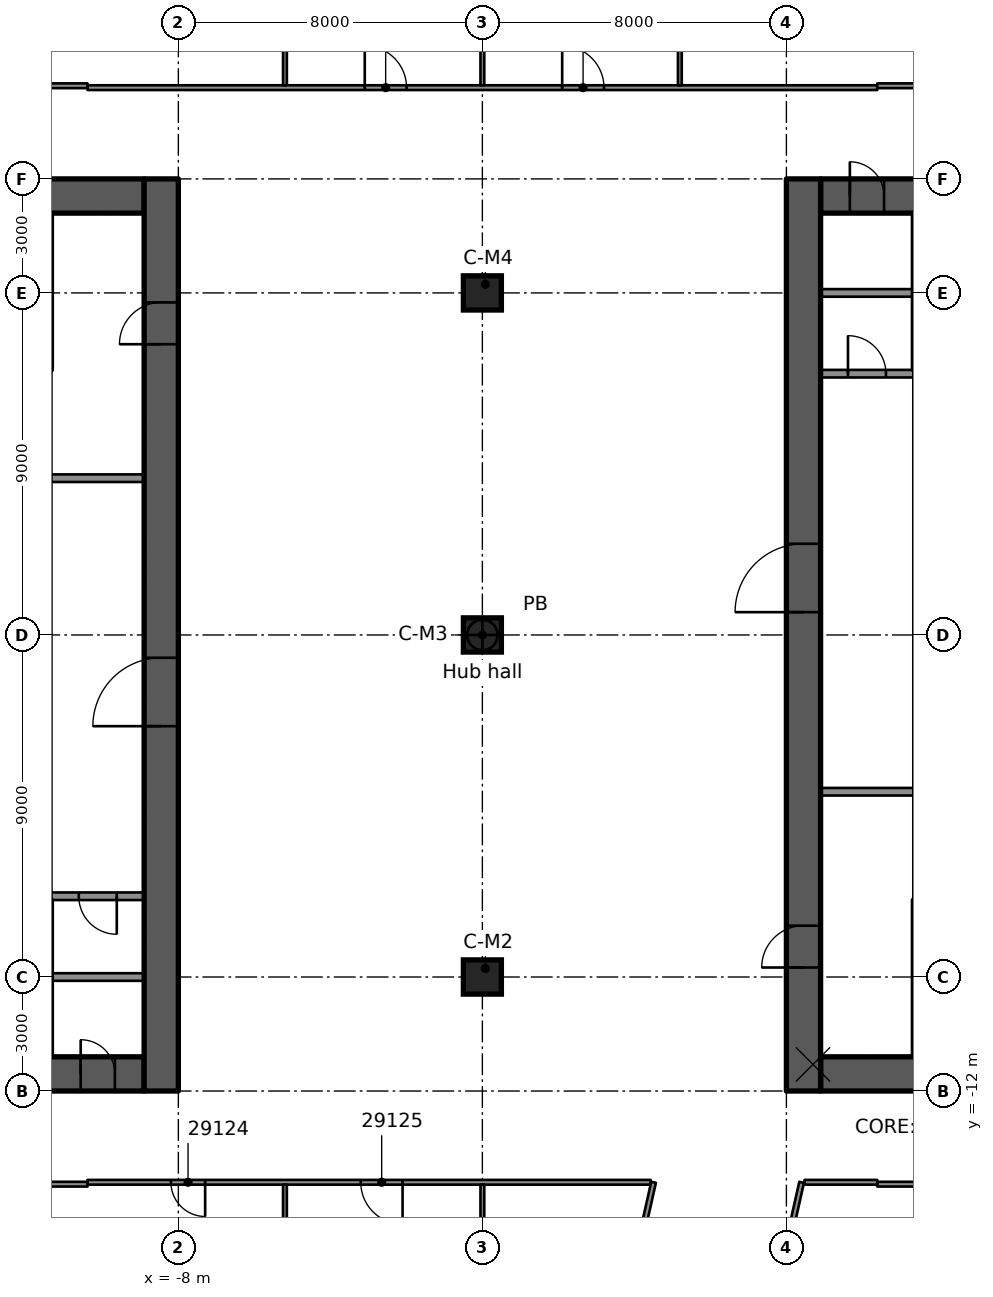
"""IFC4 building model, lengths in metres.
Left out: names, types, materials, properties, quantities, classifications, styles, units other than length and angle.
Written with IfcOpenShell. Run it as: python <this file> out.ifc"""

import sys

from ifc_helpers import new_model, si_unit, direction, frame, frame_2d, origin, origin_2d, place, context, subcontext, project, spatial, rectangle, extrude, element, fill, save


model = new_model("IFC4")
c1 = context("Model", 3, precision=1e-05, world=origin(), true_north=direction((0.0, 1.0)))
c2 = subcontext(c1, "Body", "Model", "MODEL_VIEW")
j1 = project(units=[si_unit("LENGTHUNIT", "METRE"), si_unit("PLANEANGLEUNIT", "RADIAN")], contexts=[c1])
p1 = place(None, origin())
s1 = spatial("IfcSite", under=j1, at=p1, CompositionType="ELEMENT")
p2 = place(p1, origin())
s2 = spatial("IfcBuilding", under=s1, at=p2, CompositionType="ELEMENT")
p3 = place(p2, frame((0.0, 0.0, 149.1)))
s3 = spatial("IfcBuildingStorey", under=s2, at=p3, CompositionType="ELEMENT", Elevation=149.1)
p4 = place(p3, frame((-18.1, 11.55, 0.0), z_axis=(0.0, 0.0, 1.0), x_axis=(1.0, 0.0, 0.0)))
e1 = element("IfcWall", 1, at=p4, inside=s3, PredefinedType="SHEAR", context=c2, shape_type="SweptSolid", body=[
    extrude(rectangle(XDim=9.2, YDim=0.9, at=frame_2d((4.6, 0.0))), origin(), (0.0, 0.0, 1.0), 3.5),
])
p5 = place(p4, frame((5.1, 0.0, 0.0)))
e2 = element("IfcOpeningElement", 2, at=p5, cuts=e1, PredefinedType="OPENING", context=c2, shape_type="SweptSolid", body=[
    extrude(rectangle(XDim=1.1, YDim=2.1, at=frame_2d((0.55, 1.05))), frame((0.0, 0.46, 0.0), z_axis=(0.0, -1.0, 0.0), x_axis=(1.0, 0.0, 0.0)), (0.0, 0.0, 1.0), 0.92),
])
p6 = place(p3, frame((-18.1, -11.55, 0.0), z_axis=(0.0, 0.0, 1.0), x_axis=(1.0, 0.0, 0.0)))
e3 = element("IfcWall", 3, at=p6, inside=s3, PredefinedType="SHEAR", context=c2, shape_type="SweptSolid", body=[
    extrude(rectangle(XDim=9.2, YDim=0.9, at=frame_2d((4.6, 0.0))), origin(), (0.0, 0.0, 1.0), 3.5),
])
p7 = place(p6, frame((5.1, 0.0, 0.0)))
e4 = element("IfcOpeningElement", 4, at=p7, cuts=e3, PredefinedType="OPENING", context=c2, shape_type="SweptSolid", body=[
    extrude(rectangle(XDim=1.1, YDim=2.1, at=frame_2d((0.55, 1.05))), frame((0.0, 0.46, 0.0), z_axis=(0.0, -1.0, 0.0), x_axis=(1.0, 0.0, 0.0)), (0.0, 0.0, 1.0), 0.92),
])
p8 = place(p6, frame((7.53, 0.0, 0.0)))
e5 = element("IfcOpeningElement", 5, at=p8, cuts=e3, PredefinedType="OPENING", context=c2, shape_type="SweptSolid", body=[
    extrude(rectangle(XDim=0.9, YDim=2.1, at=frame_2d((0.45, 1.05))), frame((0.0, 0.46, 0.0), z_axis=(0.0, -1.0, 0.0), x_axis=(1.0, 0.0, 0.0)), (0.0, 0.0, 1.0), 0.92),
])
p9 = place(p3, frame((-8.45, -12.0, 0.0), z_axis=(0.0, 0.0, 1.0), x_axis=(0.0, 1.0, 0.0)))
e6 = element("IfcWall", 6, at=p9, inside=s3, PredefinedType="SHEAR", context=c2, shape_type="SweptSolid", body=[
    extrude(rectangle(XDim=24.0, YDim=0.9, at=frame_2d((12.0, 0.0))), origin(), (0.0, 0.0, 1.0), 3.5),
])
p10 = place(p9, frame((9.6, 0.0, 0.0)))
e7 = element("IfcOpeningElement", 7, at=p10, cuts=e6, PredefinedType="OPENING", context=c2, shape_type="SweptSolid", body=[
    extrude(rectangle(XDim=1.8, YDim=2.1, at=frame_2d((0.9, 1.05))), frame((0.0, 0.46, 0.0), z_axis=(0.0, -1.0, 0.0), x_axis=(1.0, 0.0, 0.0)), (0.0, 0.0, 1.0), 0.92),
])
p11 = place(p9, frame((19.65, 0.0, 0.0)))
e8 = element("IfcOpeningElement", 8, at=p11, cuts=e6, PredefinedType="OPENING", context=c2, shape_type="SweptSolid", body=[
    extrude(rectangle(XDim=1.1, YDim=2.1, at=frame_2d((0.55, 1.05))), frame((0.0, 0.46, 0.0), z_axis=(0.0, -1.0, 0.0), x_axis=(1.0, 0.0, 0.0)), (0.0, 0.0, 1.0), 0.92),
])
p12 = place(p3, frame((8.9, 11.55, 0.0), z_axis=(0.0, 0.0, 1.0), x_axis=(1.0, 0.0, 0.0)))
e9 = element("IfcWall", 9, at=p12, inside=s3, PredefinedType="SHEAR", context=c2, shape_type="SweptSolid", body=[
    extrude(rectangle(XDim=9.2, YDim=0.9, at=frame_2d((4.6, 0.0))), origin(), (0.0, 0.0, 1.0), 3.5),
])
p13 = place(p12, frame((3.0, 0.0, 0.0)))
e10 = element("IfcOpeningElement", 10, at=p13, cuts=e9, PredefinedType="OPENING", context=c2, shape_type="SweptSolid", body=[
    extrude(rectangle(XDim=1.1, YDim=2.1, at=frame_2d((0.55, 1.05))), frame((0.0, 0.46, 0.0), z_axis=(0.0, -1.0, 0.0), x_axis=(1.0, 0.0, 0.0)), (0.0, 0.0, 1.0), 0.92),
])
p14 = place(p12, frame((0.77, 0.0, 0.0)))
e11 = element("IfcOpeningElement", 11, at=p14, cuts=e9, PredefinedType="OPENING", context=c2, shape_type="SweptSolid", body=[
    extrude(rectangle(XDim=0.9, YDim=2.1, at=frame_2d((0.45, 1.05))), frame((0.0, 0.46, 0.0), z_axis=(0.0, -1.0, 0.0), x_axis=(1.0, 0.0, 0.0)), (0.0, 0.0, 1.0), 0.92),
])
p15 = place(p3, frame((8.9, -11.55, 0.0), z_axis=(0.0, 0.0, 1.0), x_axis=(1.0, 0.0, 0.0)))
e12 = element("IfcWall", 12, at=p15, inside=s3, PredefinedType="SHEAR", context=c2, shape_type="SweptSolid", body=[
    extrude(rectangle(XDim=9.2, YDim=0.9, at=frame_2d((4.6, 0.0))), origin(), (0.0, 0.0, 1.0), 3.5),
])
p16 = place(p15, frame((3.0, 0.0, 0.0)))
e13 = element("IfcOpeningElement", 13, at=p16, cuts=e12, PredefinedType="OPENING", context=c2, shape_type="SweptSolid", body=[
    extrude(rectangle(XDim=1.1, YDim=2.1, at=frame_2d((0.55, 1.05))), frame((0.0, 0.46, 0.0), z_axis=(0.0, -1.0, 0.0), x_axis=(1.0, 0.0, 0.0)), (0.0, 0.0, 1.0), 0.92),
])
p17 = place(p3, frame((8.45, -12.0, 0.0), z_axis=(0.0, 0.0, 1.0), x_axis=(0.0, 1.0, 0.0)))
e14 = element("IfcWall", 14, at=p17, inside=s3, PredefinedType="SHEAR", context=c2, shape_type="SweptSolid", body=[
    extrude(rectangle(XDim=24.0, YDim=0.9, at=frame_2d((12.0, 0.0))), origin(), (0.0, 0.0, 1.0), 3.5),
])
p18 = place(p17, frame((12.6, 0.0, 0.0)))
e15 = element("IfcOpeningElement", 15, at=p18, cuts=e14, PredefinedType="OPENING", context=c2, shape_type="SweptSolid", body=[
    extrude(rectangle(XDim=1.8, YDim=2.1, at=frame_2d((0.9, 1.05))), frame((0.0, 0.46, 0.0), z_axis=(0.0, -1.0, 0.0), x_axis=(1.0, 0.0, 0.0)), (0.0, 0.0, 1.0), 0.92),
])
p19 = place(p17, frame((3.25, 0.0, 0.0)))
e16 = element("IfcOpeningElement", 16, at=p19, cuts=e14, PredefinedType="OPENING", context=c2, shape_type="SweptSolid", body=[
    extrude(rectangle(XDim=1.1, YDim=2.1, at=frame_2d((0.55, 1.05))), frame((0.0, 0.46, 0.0), z_axis=(0.0, -1.0, 0.0), x_axis=(1.0, 0.0, 0.0)), (0.0, 0.0, 1.0), 0.92),
])
for number, where, z_axis, x_axis in (
    (17, (0.0, -9.0, 0.0), (0.0, 0.0, 1.0), (1.0, 0.0, 0.0)),
    (18, (0.0, 0.0, 0.0), (0.0, 0.0, 1.0), (1.0, 0.0, 0.0)),
    (19, (0.0, 9.0, 0.0), (0.0, 0.0, 1.0), (1.0, 0.0, 0.0)),
):
    element("IfcColumn", number, at=place(p3, frame(where, z_axis=z_axis, x_axis=x_axis)), inside=s3, PredefinedType="COLUMN", context=c2, shape_type="SweptSolid", body=[
        extrude(rectangle(XDim=1.0, YDim=0.9, at=origin_2d()), origin(), (0.0, 0.0, 1.0), 3.5),
    ])
p20 = place(p3, frame((-8.9, 4.125, 0.0), z_axis=(0.0, 0.0, 1.0), x_axis=(-1.0, 0.0, 0.0)))
e20 = element("IfcWall", 20, at=p20, inside=s3, PredefinedType="PARTITIONING", context=c2, shape_type="SweptSolid", body=[
    extrude(rectangle(XDim=2.44, YDim=0.2, at=frame_2d((1.22, 0.0))), origin(), (0.0, 0.0, 1.0), 3.09),
])
p21 = place(p3, frame((-8.9, -6.875, 0.0), z_axis=(0.0, 0.0, 1.0), x_axis=(-1.0, 0.0, 0.0)))
e21 = element("IfcWall", 21, at=p21, inside=s3, PredefinedType="PARTITIONING", context=c2, shape_type="SweptSolid", body=[
    extrude(rectangle(XDim=2.44, YDim=0.2, at=frame_2d((1.22, 0.0))), origin(), (0.0, 0.0, 1.0), 3.09),
])
p22 = place(p21, frame((0.72, 0.0, 0.0)))
e22 = element("IfcOpeningElement", 22, at=p22, cuts=e21, PredefinedType="OPENING", context=c2, shape_type="SweptSolid", body=[
    extrude(rectangle(XDim=1.0, YDim=2.1, at=frame_2d((0.5, 1.05))), frame((0.0, 0.11, 0.0), z_axis=(0.0, -1.0, 0.0), x_axis=(1.0, 0.0, 0.0)), (0.0, 0.0, 1.0), 0.22),
])
for number, where, z_axis, x_axis in (
    (23, (-8.9, -9.0, 0.0), (0.0, 0.0, 1.0), (-1.0, 0.0, 0.0)),
    (24, (8.9, -4.125, 0.0), (0.0, 0.0, 1.0), (1.0, 0.0, 0.0)),
):
    element("IfcWall", number, at=place(p3, frame(where, z_axis=z_axis, x_axis=x_axis)), inside=s3, PredefinedType="PARTITIONING", context=c2, shape_type="SweptSolid", body=[
        extrude(rectangle(XDim=2.44, YDim=0.2, at=frame_2d((1.22, 0.0))), origin(), (0.0, 0.0, 1.0), 3.09),
    ])
p23 = place(p3, frame((8.9, 6.875, 0.0), z_axis=(0.0, 0.0, 1.0), x_axis=(1.0, 0.0, 0.0)))
e25 = element("IfcWall", 25, at=p23, inside=s3, PredefinedType="PARTITIONING", context=c2, shape_type="SweptSolid", body=[
    extrude(rectangle(XDim=2.44, YDim=0.2, at=frame_2d((1.22, 0.0))), origin(), (0.0, 0.0, 1.0), 3.09),
])
p24 = place(p23, frame((0.72, 0.0, 0.0)))
e26 = element("IfcOpeningElement", 26, at=p24, cuts=e25, PredefinedType="OPENING", context=c2, shape_type="SweptSolid", body=[
    extrude(rectangle(XDim=1.0, YDim=2.1, at=frame_2d((0.5, 1.05))), frame((0.0, 0.11, 0.0), z_axis=(0.0, -1.0, 0.0), x_axis=(1.0, 0.0, 0.0)), (0.0, 0.0, 1.0), 0.22),
])
p25 = place(p3, frame((8.9, 9.0, 0.0), z_axis=(0.0, 0.0, 1.0), x_axis=(1.0, 0.0, 0.0)))
e27 = element("IfcWall", 27, at=p25, inside=s3, PredefinedType="PARTITIONING", context=c2, shape_type="SweptSolid", body=[
    extrude(rectangle(XDim=2.44, YDim=0.2, at=frame_2d((1.22, 0.0))), origin(), (0.0, 0.0, 1.0), 3.09),
])
p26 = place(p3, frame((-10.391, -14.451, 0.0), z_axis=(0.0, 0.0, 1.0), x_axis=(-1.0, 0.0, 0.0)))
e28 = element("IfcWall", 28, at=p26, inside=s3, PredefinedType="PARTITIONING", context=c2, shape_type="SweptSolid", body=[
    extrude(rectangle(XDim=5.043, YDim=0.125, at=frame_2d((2.521, 0.0))), origin(), (0.0, 0.0, 1.0), 3.08),
])
p27 = place(p26, frame((2.1, 0.0, 0.0)))
e29 = element("IfcOpeningElement", 29, at=p27, cuts=e28, PredefinedType="OPENING", context=c2, shape_type="SweptSolid", body=[
    extrude(rectangle(XDim=0.9, YDim=2.1, at=frame_2d((0.45, 1.05))), frame((0.0, 0.073, 0.0), z_axis=(0.0, -1.0, 0.0), x_axis=(1.0, 0.0, 0.0)), (0.0, 0.0, 1.0), 0.145),
])
p28 = place(p3, frame((21.387, -14.451, 0.0), z_axis=(0.0, 0.0, 1.0), x_axis=(-1.0, 0.0, 0.0)))
e30 = element("IfcWall", 30, at=p28, inside=s3, PredefinedType="PARTITIONING", context=c2, shape_type="SweptSolid", body=[
    extrude(rectangle(XDim=10.996, YDim=0.125, at=frame_2d((5.498, 0.0))), origin(), (0.0, 0.0, 1.0), 3.08),
])
p29 = place(p28, frame((5.038, 0.0, 0.0)))
e31 = element("IfcOpeningElement", 31, at=p29, cuts=e30, PredefinedType="OPENING", context=c2, shape_type="SweptSolid", body=[
    extrude(rectangle(XDim=0.9, YDim=2.1, at=frame_2d((0.45, 1.05))), frame((0.0, 0.073, 0.0), z_axis=(0.0, -1.0, 0.0), x_axis=(1.0, 0.0, 0.0)), (0.0, 0.0, 1.0), 0.145),
])
p30 = place(p3, frame((4.427, -14.401, 0.0), z_axis=(0.0, 0.0, 1.0), x_axis=(-1.0, 0.0, 0.0)))
e32 = element("IfcWall", 32, at=p30, inside=s3, PredefinedType="PARTITIONING", context=c2, shape_type="SweptSolid", body=[
    extrude(rectangle(XDim=14.817, YDim=0.125, at=frame_2d((7.408, 0.0))), origin(), (0.0, 0.0, 1.0), 3.08),
])
p31 = place(p30, frame((11.722, 0.0, 0.0)))
e33 = element("IfcOpeningElement", 33, at=p31, cuts=e32, PredefinedType="OPENING", context=c2, shape_type="SweptSolid", body=[
    extrude(rectangle(XDim=0.9, YDim=2.1, at=frame_2d((0.45, 1.05))), frame((0.0, 0.073, 0.0), z_axis=(0.0, -1.0, 0.0), x_axis=(1.0, 0.0, 0.0)), (0.0, 0.0, 1.0), 0.145),
])
p32 = place(p30, frame((6.527, 0.0, 0.0)))
e34 = element("IfcOpeningElement", 34, at=p32, cuts=e32, PredefinedType="OPENING", context=c2, shape_type="SweptSolid", body=[
    extrude(rectangle(XDim=1.1, YDim=2.1, at=frame_2d((0.55, 1.05))), frame((0.0, 0.073, 0.0), z_axis=(0.0, -1.0, 0.0), x_axis=(1.0, 0.0, 0.0)), (0.0, 0.0, 1.0), 0.145),
])
p33 = place(p3, frame((8.479, -14.401, 0.0), z_axis=(0.0, 0.0, 1.0), x_axis=(1.0, 0.0, 0.0)))
e35 = element("IfcWall", 35, at=p33, inside=s3, PredefinedType="PARTITIONING", context=c2, shape_type="SweptSolid", body=[
    extrude(rectangle(XDim=1.912, YDim=0.125, at=frame_2d((0.956, 0.0))), origin(), (0.0, 0.0, 1.0), 3.08),
])
p34 = place(p3, frame((-10.39, 14.401, 0.0), z_axis=(0.0, 0.0, 1.0), x_axis=(1.0, 0.0, 0.0)))
e36 = element("IfcWall", 36, at=p34, inside=s3, PredefinedType="PARTITIONING", context=c2, shape_type="SweptSolid", body=[
    extrude(rectangle(XDim=20.781, YDim=0.125, at=frame_2d((10.391, 0.0))), origin(), (0.0, 0.0, 1.0), 3.08),
])
p35 = place(p34, frame((12.49, 0.0, 0.0)))
e37 = element("IfcOpeningElement", 37, at=p35, cuts=e36, PredefinedType="OPENING", context=c2, shape_type="SweptSolid", body=[
    extrude(rectangle(XDim=1.1, YDim=2.1, at=frame_2d((0.55, 1.05))), frame((0.0, 0.073, 0.0), z_axis=(0.0, -1.0, 0.0), x_axis=(1.0, 0.0, 0.0)), (0.0, 0.0, 1.0), 0.145),
])
p36 = place(p34, frame((7.295, 0.0, 0.0)))
e38 = element("IfcOpeningElement", 38, at=p36, cuts=e36, PredefinedType="OPENING", context=c2, shape_type="SweptSolid", body=[
    extrude(rectangle(XDim=1.1, YDim=2.1, at=frame_2d((0.55, 1.05))), frame((0.0, 0.073, 0.0), z_axis=(0.0, -1.0, 0.0), x_axis=(1.0, 0.0, 0.0)), (0.0, 0.0, 1.0), 0.145),
])
p37 = place(p3, frame((-21.387, 14.451, 0.0), z_axis=(0.0, 0.0, 1.0), x_axis=(1.0, 0.0, 0.0)))
e39 = element("IfcWall", 39, at=p37, inside=s3, PredefinedType="PARTITIONING", context=c2, shape_type="SweptSolid", body=[
    extrude(rectangle(XDim=10.996, YDim=0.125, at=frame_2d((5.498, 0.0))), origin(), (0.0, 0.0, 1.0), 3.08),
])
p38 = place(p37, frame((7.317, 0.0, 0.0)))
e40 = element("IfcOpeningElement", 40, at=p38, cuts=e39, PredefinedType="OPENING", context=c2, shape_type="SweptSolid", body=[
    extrude(rectangle(XDim=1.8, YDim=2.1, at=frame_2d((0.9, 1.05))), frame((0.0, 0.073, 0.0), z_axis=(0.0, -1.0, 0.0), x_axis=(1.0, 0.0, 0.0)), (0.0, 0.0, 1.0), 0.145),
])
p39 = place(p3, frame((10.391, 14.451, 0.0), z_axis=(0.0, 0.0, 1.0), x_axis=(1.0, 0.0, 0.0)))
e41 = element("IfcWall", 41, at=p39, inside=s3, PredefinedType="PARTITIONING", context=c2, shape_type="SweptSolid", body=[
    extrude(rectangle(XDim=10.996, YDim=0.125, at=frame_2d((5.498, 0.0))), origin(), (0.0, 0.0, 1.0), 3.08),
])
p40 = place(p39, frame((7.38, 0.0, 0.0)))
e42 = element("IfcOpeningElement", 42, at=p40, cuts=e41, PredefinedType="OPENING", context=c2, shape_type="SweptSolid", body=[
    extrude(rectangle(XDim=1.8, YDim=2.1, at=frame_2d((0.9, 1.05))), frame((0.0, 0.073, 0.0), z_axis=(0.0, -1.0, 0.0), x_axis=(1.0, 0.0, 0.0)), (0.0, 0.0, 1.0), 0.145),
])
p41 = place(p39, frame((1.85, 0.0, 0.0)))
e43 = element("IfcOpeningElement", 43, at=p41, cuts=e41, PredefinedType="OPENING", context=c2, shape_type="SweptSolid", body=[
    extrude(rectangle(XDim=1.8, YDim=2.1, at=frame_2d((0.9, 1.05))), frame((0.0, 0.073, 0.0), z_axis=(0.0, -1.0, 0.0), x_axis=(1.0, 0.0, 0.0)), (0.0, 0.0, 1.0), 0.145),
])
p42 = place(p3, frame((7.569, -18.107, 0.0), z_axis=(0.0, 0.0, 1.0), x_axis=(0.218992134919, 0.975726624031, 0.0)))
e44 = element("IfcWall", 44, at=p42, inside=s3, PredefinedType="PARTITIONING", context=c2, shape_type="SweptSolid", body=[
    extrude(rectangle(XDim=3.798, YDim=0.125, at=frame_2d((1.899, 0.0))), origin(), (0.0, 0.0, 1.0), 3.08),
])
p43 = place(p3, frame((3.86, -17.274, 0.0), z_axis=(0.0, 0.0, 1.0), x_axis=(0.218975515368, 0.975730353976, 0.0)))
e45 = element("IfcWall", 45, at=p43, inside=s3, PredefinedType="PARTITIONING", context=c2, shape_type="SweptSolid", body=[
    extrude(rectangle(XDim=2.945, YDim=0.125, at=frame_2d((1.472, 0.0))), origin(), (0.0, 0.0, 1.0), 3.08),
])
p44 = place(p3, frame((5.196, 14.463, 0.0), z_axis=(0.0, 0.0, 1.0), x_axis=(0.0, 1.0, 0.0)))
e46 = element("IfcWall", 46, at=p44, inside=s3, PredefinedType="PARTITIONING", context=c2, shape_type="SweptSolid", body=[
    extrude(rectangle(XDim=15.343, YDim=0.1, at=frame_2d((7.671, 0.0))), origin(), (0.0, 0.0, 1.0), 3.08),
])
p45 = place(p3, frame((0.0, -32.297, 0.0), z_axis=(0.0, 0.0, 1.0), x_axis=(0.0, 1.0, 0.0)))
e47 = element("IfcWall", 47, at=p45, inside=s3, PredefinedType="PARTITIONING", context=c2, shape_type="SweptSolid", body=[
    extrude(rectangle(XDim=17.834, YDim=0.1, at=frame_2d((8.917, 0.0))), origin(), (0.0, 0.0, 1.0), 3.08),
])
p46 = place(p3, frame((0.0, 14.463, 0.0), z_axis=(0.0, 0.0, 1.0), x_axis=(0.0, 1.0, 0.0)))
e48 = element("IfcWall", 48, at=p46, inside=s3, PredefinedType="PARTITIONING", context=c2, shape_type="SweptSolid", body=[
    extrude(rectangle(XDim=16.353, YDim=0.1, at=frame_2d((8.177, 0.0))), origin(), (0.0, 0.0, 1.0), 3.08),
])
p47 = place(p3, frame((-5.195, -30.559, 0.0), z_axis=(0.0, 0.0, 1.0), x_axis=(0.0, 1.0, 0.0)))
e49 = element("IfcWall", 49, at=p47, inside=s3, PredefinedType="PARTITIONING", context=c2, shape_type="SweptSolid", body=[
    extrude(rectangle(XDim=16.096, YDim=0.1, at=frame_2d((8.048, 0.0))), origin(), (0.0, 0.0, 1.0), 3.08),
])
p48 = place(p3, frame((-5.195, 14.463, 0.0), z_axis=(0.0, 0.0, 1.0), x_axis=(0.0, 1.0, 0.0)))
e50 = element("IfcWall", 50, at=p48, inside=s3, PredefinedType="PARTITIONING", context=c2, shape_type="SweptSolid", body=[
    extrude(rectangle(XDim=17.363, YDim=0.1, at=frame_2d((8.682, 0.0))), origin(), (0.0, 0.0, 1.0), 3.08),
])
p49 = place(p10, origin())
e51 = element("IfcDoor", 51, at=p49, inside=s3, OperationType="SINGLE_SWING_LEFT", PredefinedType="DOOR", context=c2, shape_type="SweptSolid", body=[
    extrude(rectangle(XDim=1.8, YDim=2.1, at=frame_2d((0.9, 1.05))), frame((0.0, 0.025, 0.0), z_axis=(0.0, -1.0, 0.0), x_axis=(1.0, 0.0, 0.0)), (0.0, 0.0, 1.0), 0.05),
])
fill(e7, e51)
p50 = place(p11, origin())
e52 = element("IfcDoor", 52, at=p50, inside=s3, OperationType="SINGLE_SWING_RIGHT", PredefinedType="DOOR", context=c2, shape_type="SweptSolid", body=[
    extrude(rectangle(XDim=1.1, YDim=2.1, at=frame_2d((0.55, 1.05))), frame((0.0, 0.025, 0.0), z_axis=(0.0, -1.0, 0.0), x_axis=(1.0, 0.0, 0.0)), (0.0, 0.0, 1.0), 0.05),
])
fill(e8, e52)
p51 = place(p8, origin())
e53 = element("IfcDoor", 53, at=p51, inside=s3, OperationType="SINGLE_SWING_RIGHT", PredefinedType="DOOR", context=c2, shape_type="SweptSolid", body=[
    extrude(rectangle(XDim=0.9, YDim=2.1, at=frame_2d((0.45, 1.05))), frame((0.0, 0.025, 0.0), z_axis=(0.0, -1.0, 0.0), x_axis=(1.0, 0.0, 0.0)), (0.0, 0.0, 1.0), 0.05),
])
fill(e5, e53)
p52 = place(p22, origin())
e54 = element("IfcDoor", 54, at=p52, inside=s3, OperationType="SINGLE_SWING_RIGHT", PredefinedType="DOOR", context=c2, shape_type="SweptSolid", body=[
    extrude(rectangle(XDim=1.0, YDim=2.1, at=frame_2d((0.5, 1.05))), frame((0.0, 0.025, 0.0), z_axis=(0.0, -1.0, 0.0), x_axis=(1.0, 0.0, 0.0)), (0.0, 0.0, 1.0), 0.05),
])
fill(e22, e54)
p53 = place(p18, origin())
e55 = element("IfcDoor", 55, at=p53, inside=s3, OperationType="SINGLE_SWING_RIGHT", PredefinedType="DOOR", context=c2, shape_type="SweptSolid", body=[
    extrude(rectangle(XDim=1.8, YDim=2.1, at=frame_2d((0.9, 1.05))), frame((0.0, 0.025, 0.0), z_axis=(0.0, -1.0, 0.0), x_axis=(1.0, 0.0, 0.0)), (0.0, 0.0, 1.0), 0.05),
])
fill(e15, e55)
p54 = place(p19, origin())
e56 = element("IfcDoor", 56, at=p54, inside=s3, OperationType="SINGLE_SWING_LEFT", PredefinedType="DOOR", context=c2, shape_type="SweptSolid", body=[
    extrude(rectangle(XDim=1.1, YDim=2.1, at=frame_2d((0.55, 1.05))), frame((0.0, 0.025, 0.0), z_axis=(0.0, -1.0, 0.0), x_axis=(1.0, 0.0, 0.0)), (0.0, 0.0, 1.0), 0.05),
])
fill(e16, e56)
p55 = place(p14, origin())
e57 = element("IfcDoor", 57, at=p55, inside=s3, OperationType="SINGLE_SWING_LEFT", PredefinedType="DOOR", context=c2, shape_type="SweptSolid", body=[
    extrude(rectangle(XDim=0.9, YDim=2.1, at=frame_2d((0.45, 1.05))), frame((0.0, 0.025, 0.0), z_axis=(0.0, -1.0, 0.0), x_axis=(1.0, 0.0, 0.0)), (0.0, 0.0, 1.0), 0.05),
])
fill(e11, e57)
p56 = place(p24, origin())
e58 = element("IfcDoor", 58, at=p56, inside=s3, OperationType="SINGLE_SWING_RIGHT", PredefinedType="DOOR", context=c2, shape_type="SweptSolid", body=[
    extrude(rectangle(XDim=1.0, YDim=2.1, at=frame_2d((0.5, 1.05))), frame((0.0, 0.025, 0.0), z_axis=(0.0, -1.0, 0.0), x_axis=(1.0, 0.0, 0.0)), (0.0, 0.0, 1.0), 0.05),
])
fill(e26, e58)
p57 = place(p31, origin())
e59 = element("IfcDoor", 59, at=p57, inside=s3, OperationType="SINGLE_SWING_RIGHT", PredefinedType="DOOR", context=c2, shape_type="SweptSolid", body=[
    extrude(rectangle(XDim=0.9, YDim=2.1, at=frame_2d((0.45, 1.05))), frame((0.0, 0.025, 0.0), z_axis=(0.0, -1.0, 0.0), x_axis=(1.0, 0.0, 0.0)), (0.0, 0.0, 1.0), 0.05),
])
fill(e33, e59)
p58 = place(p32, origin())
e60 = element("IfcDoor", 60, at=p58, inside=s3, OperationType="SINGLE_SWING_LEFT", PredefinedType="DOOR", context=c2, shape_type="SweptSolid", body=[
    extrude(rectangle(XDim=1.1, YDim=2.1, at=frame_2d((0.55, 1.05))), frame((0.0, 0.025, 0.0), z_axis=(0.0, -1.0, 0.0), x_axis=(1.0, 0.0, 0.0)), (0.0, 0.0, 1.0), 0.05),
])
fill(e34, e60)
p59 = place(p35, origin())
e61 = element("IfcDoor", 61, at=p59, inside=s3, OperationType="SINGLE_SWING_RIGHT", PredefinedType="DOOR", context=c2, shape_type="SweptSolid", body=[
    extrude(rectangle(XDim=1.1, YDim=2.1, at=frame_2d((0.55, 1.05))), frame((0.0, 0.025, 0.0), z_axis=(0.0, -1.0, 0.0), x_axis=(1.0, 0.0, 0.0)), (0.0, 0.0, 1.0), 0.05),
])
fill(e37, e61)
p60 = place(p36, origin())
e62 = element("IfcDoor", 62, at=p60, inside=s3, OperationType="SINGLE_SWING_LEFT", PredefinedType="DOOR", context=c2, shape_type="SweptSolid", body=[
    extrude(rectangle(XDim=1.1, YDim=2.1, at=frame_2d((0.55, 1.05))), frame((0.0, 0.025, 0.0), z_axis=(0.0, -1.0, 0.0), x_axis=(1.0, 0.0, 0.0)), (0.0, 0.0, 1.0), 0.05),
])
fill(e38, e62)
save(model, sys.argv[1])
